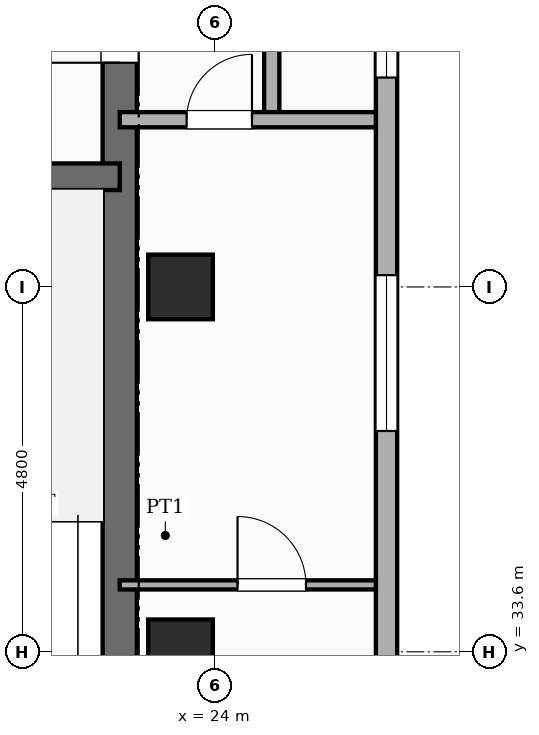
"""IFC4 building model, lengths in metres.
Left out: names, types, materials, properties, quantities, classifications, styles, units other than length and angle.
Written with IfcOpenShell. Run it as: python <this file> out.ifc"""

import sys

from ifc_helpers import new_model, si_unit, direction, frame, frame_2d, origin, origin_2d, place, context, subcontext, project, spatial, rectangle, extrude, element, fill, save


model = new_model("IFC4")
c1 = context("Model", 3, precision=1e-05, world=origin(), true_north=direction((0.0, 1.0)))
c2 = subcontext(c1, "Body", "Model", "MODEL_VIEW")
j1 = project(units=[si_unit("LENGTHUNIT", "METRE"), si_unit("PLANEANGLEUNIT", "RADIAN")], contexts=[c1])
p1 = place(None, origin())
s1 = spatial("IfcSite", under=j1, at=p1, CompositionType="ELEMENT")
p2 = place(p1, origin())
s2 = spatial("IfcBuilding", under=s1, at=p2, CompositionType="ELEMENT")
p3 = place(p2, frame((0.0, 0.0, 203.8)))
s3 = spatial("IfcBuildingStorey", under=s2, at=p3, CompositionType="ELEMENT", Elevation=203.8)
p4 = place(p3, frame((22.75, 30.675, 0.0), z_axis=(0.0, 0.0, 1.0), x_axis=(0.0, 1.0, 0.0)))
e1 = element("IfcWall", 1, at=p4, inside=s3, PredefinedType="SHEAR", context=c2, shape_type="SweptSolid", body=[
    extrude(rectangle(XDim=15.35, YDim=0.45, at=frame_2d((7.675, 0.0))), origin(), (0.0, 0.0, 1.0), 3.6),
])
p5 = place(p4, frame((10.675, 0.0, 0.0)))
e2 = element("IfcOpeningElement", 2, at=p5, cuts=e1, PredefinedType="OPENING", context=c2, shape_type="SweptSolid", body=[
    extrude(rectangle(XDim=1.0, YDim=2.15, at=frame_2d((0.5, 1.075))), frame((0.0, 0.235, 0.0), z_axis=(0.0, -1.0, 0.0), x_axis=(1.0, 0.0, 0.0)), (0.0, 0.0, 1.0), 0.47),
])
p6 = place(p3, frame((18.84, 39.85, 0.0), z_axis=(0.0, 0.0, 1.0), x_axis=(1.0, 0.0, 0.0)))
e3 = element("IfcWall", 3, at=p6, inside=s3, PredefinedType="SHEAR", context=c2, shape_type="SweptSolid", body=[
    extrude(rectangle(XDim=3.91, YDim=0.35, at=frame_2d((1.955, 0.0))), origin(), (0.0, 0.0, 1.0), 3.6),
])
for number, where, z_axis, x_axis in (
    (4, (23.55, 33.6, 0.0), (0.0, 0.0, 1.0), (1.0, 0.0, 0.0)),
    (5, (23.55, 38.4, 0.0), (0.0, 0.0, 1.0), (1.0, 0.0, 0.0)),
):
    element("IfcColumn", number, at=place(p3, frame(where, z_axis=z_axis, x_axis=x_axis)), inside=s3, PredefinedType="COLUMN", context=c2, shape_type="SweptSolid", body=[
        extrude(rectangle(XDim=0.85, YDim=0.85, at=origin_2d()), origin(), (0.0, 0.0, 1.0), 3.6),
    ])
p7 = place(p3, frame((26.26, 43.8, 0.0), z_axis=(0.0, 0.0, 1.0), x_axis=(0.0, -1.0, 0.0)))
e6 = element("IfcWall", 6, at=p7, inside=s3, PredefinedType="STANDARD", context=c2, shape_type="SweptSolid", body=[
    extrude(rectangle(XDim=15.0, YDim=0.28, at=frame_2d((7.5, 0.0))), origin(), (0.0, 0.0, 1.0), 3.38),
])
p8 = place(p7, frame((10.59, 0.0, 0.8)))
e7 = element("IfcOpeningElement", 7, at=p8, cuts=e6, PredefinedType="OPENING", context=c2, shape_type="SweptSolid", body=[
    extrude(rectangle(XDim=2.05, YDim=1.95, at=frame_2d((1.025, 0.975))), frame((0.0, 0.15, 0.0), z_axis=(0.0, -1.0, 0.0), x_axis=(1.0, 0.0, 0.0)), (0.0, 0.0, 1.0), 0.3),
])
p9 = place(p7, frame((5.245, 0.0, 0.8)))
e8 = element("IfcOpeningElement", 8, at=p9, cuts=e6, PredefinedType="OPENING", context=c2, shape_type="SweptSolid", body=[
    extrude(rectangle(XDim=2.05, YDim=1.95, at=frame_2d((1.025, 0.975))), frame((0.0, 0.15, 0.0), z_axis=(0.0, -1.0, 0.0), x_axis=(1.0, 0.0, 0.0)), (0.0, 0.0, 1.0), 0.3),
])
p10 = place(p7, frame((0.595, 0.0, 0.8)))
e9 = element("IfcOpeningElement", 9, at=p10, cuts=e6, PredefinedType="OPENING", context=c2, shape_type="SweptSolid", body=[
    extrude(rectangle(XDim=2.05, YDim=1.95, at=frame_2d((1.025, 0.975))), frame((0.0, 0.15, 0.0), z_axis=(0.0, -1.0, 0.0), x_axis=(1.0, 0.0, 0.0)), (0.0, 0.0, 1.0), 0.3),
])
p11 = place(p3, frame((24.75, 40.6, 0.0), z_axis=(0.0, 0.0, 1.0), x_axis=(0.0, 1.0, 0.0)))
e10 = element("IfcWall", 10, at=p11, inside=s3, PredefinedType="PARTITIONING", context=c2, shape_type="SweptSolid", body=[
    extrude(rectangle(XDim=4.2, YDim=0.2, at=frame_2d((2.1, 0.0))), origin(), (0.0, 0.0, 1.0), 3.38),
])
p12 = place(p11, frame((1.0, 0.0, 0.0)))
e11 = element("IfcOpeningElement", 11, at=p12, cuts=e10, PredefinedType="OPENING", context=c2, shape_type="SweptSolid", body=[
    extrude(rectangle(XDim=0.86, YDim=2.1, at=frame_2d((0.43, 1.05))), frame((0.0, 0.11, 0.0), z_axis=(0.0, -1.0, 0.0), x_axis=(1.0, 0.0, 0.0)), (0.0, 0.0, 1.0), 0.22),
])
p13 = place(p3, frame((22.75, 40.6, 0.0), z_axis=(0.0, 0.0, 1.0), x_axis=(1.0, 0.0, 0.0)))
e12 = element("IfcWall", 12, at=p13, inside=s3, PredefinedType="PARTITIONING", context=c2, shape_type="SweptSolid", body=[
    extrude(rectangle(XDim=3.37, YDim=0.2, at=frame_2d((1.685, 0.0))), origin(), (0.0, 0.0, 1.0), 3.38),
])
p14 = place(p13, frame((0.88, 0.0, 0.0)))
e13 = element("IfcOpeningElement", 13, at=p14, cuts=e12, PredefinedType="OPENING", context=c2, shape_type="SweptSolid", body=[
    extrude(rectangle(XDim=0.86, YDim=2.1, at=frame_2d((0.43, 1.05))), frame((0.0, 0.11, 0.0), z_axis=(0.0, -1.0, 0.0), x_axis=(1.0, 0.0, 0.0)), (0.0, 0.0, 1.0), 0.22),
])
p15 = place(p3, frame((22.75, 34.48, 0.0), z_axis=(0.0, 0.0, 1.0), x_axis=(1.0, 0.0, 0.0)))
e14 = element("IfcWall", 14, at=p15, inside=s3, PredefinedType="PARTITIONING", context=c2, shape_type="SweptSolid", body=[
    extrude(rectangle(XDim=3.37, YDim=0.12, at=frame_2d((1.685, 0.0))), origin(), (0.0, 0.0, 1.0), 3.38),
])
p16 = place(p15, frame((1.55, 0.0, 0.0)))
e15 = element("IfcOpeningElement", 15, at=p16, cuts=e14, PredefinedType="OPENING", context=c2, shape_type="SweptSolid", body=[
    extrude(rectangle(XDim=0.9, YDim=2.15, at=frame_2d((0.45, 1.075))), frame((0.0, 0.07, 0.0), z_axis=(0.0, -1.0, 0.0), x_axis=(1.0, 0.0, 0.0)), (0.0, 0.0, 1.0), 0.14),
])
p17 = place(p9, origin())
e16 = element("IfcWindow", 16, at=p17, inside=s3, PartitioningType="SINGLE_PANEL", PredefinedType="WINDOW", context=c2, shape_type="SweptSolid", body=[
    extrude(rectangle(XDim=2.05, YDim=1.95, at=frame_2d((1.025, 0.975))), frame((0.0, 0.03, 0.0), z_axis=(0.0, -1.0, 0.0), x_axis=(1.0, 0.0, 0.0)), (0.0, 0.0, 1.0), 0.06),
])
fill(e8, e16)
p18 = place(p10, origin())
e17 = element("IfcWindow", 17, at=p18, inside=s3, PartitioningType="SINGLE_PANEL", PredefinedType="WINDOW", context=c2, shape_type="SweptSolid", body=[
    extrude(rectangle(XDim=2.05, YDim=1.95, at=frame_2d((1.025, 0.975))), frame((0.0, 0.03, 0.0), z_axis=(0.0, -1.0, 0.0), x_axis=(1.0, 0.0, 0.0)), (0.0, 0.0, 1.0), 0.06),
])
fill(e9, e17)
p19 = place(p5, origin())
e18 = element("IfcDoor", 18, at=p19, inside=s3, OperationType="SINGLE_SWING_LEFT", PredefinedType="DOOR", context=c2, shape_type="SweptSolid", body=[
    extrude(rectangle(XDim=1.0, YDim=2.15, at=frame_2d((0.5, 1.075))), frame((0.0, 0.025, 0.0), z_axis=(0.0, -1.0, 0.0), x_axis=(1.0, 0.0, 0.0)), (0.0, 0.0, 1.0), 0.05),
])
fill(e2, e18)
p20 = place(p14, origin())
e19 = element("IfcDoor", 19, at=p20, inside=s3, OperationType="SINGLE_SWING_RIGHT", PredefinedType="DOOR", context=c2, shape_type="SweptSolid", body=[
    extrude(rectangle(XDim=0.86, YDim=2.1, at=frame_2d((0.43, 1.05))), frame((0.0, 0.025, 0.0), z_axis=(0.0, -1.0, 0.0), x_axis=(1.0, 0.0, 0.0)), (0.0, 0.0, 1.0), 0.05),
])
fill(e13, e19)
p21 = place(p16, origin())
e20 = element("IfcDoor", 20, at=p21, inside=s3, OperationType="SINGLE_SWING_LEFT", PredefinedType="DOOR", context=c2, shape_type="SweptSolid", body=[
    extrude(rectangle(XDim=0.9, YDim=2.15, at=frame_2d((0.45, 1.075))), frame((0.0, 0.025, 0.0), z_axis=(0.0, -1.0, 0.0), x_axis=(1.0, 0.0, 0.0)), (0.0, 0.0, 1.0), 0.05),
])
fill(e15, e20)
save(model, sys.argv[1])
